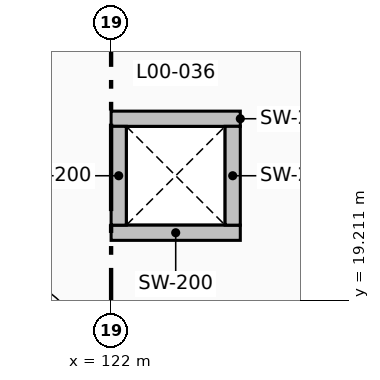
"""IFC4 building model, lengths in metres.
Left out: names, types, materials, properties, quantities, classifications, styles, units other than length and angle.
Written with IfcOpenShell. Run it as: python <this file> out.ifc"""

import sys

from ifc_helpers import new_model, si_unit, direction, frame, frame_2d, origin, place, context, subcontext, project, spatial, rectangle, extrude, element, save


model = new_model("IFC4")
c1 = context("Model", 3, precision=1e-05, world=origin(), true_north=direction((0.0, 1.0)))
c2 = subcontext(c1, "Body", "Model", "MODEL_VIEW")
j1 = project(units=[si_unit("LENGTHUNIT", "METRE"), si_unit("PLANEANGLEUNIT", "RADIAN")], contexts=[c1])
p1 = place(None, origin())
s1 = spatial("IfcSite", under=j1, at=p1, CompositionType="ELEMENT")
p2 = place(p1, origin())
s2 = spatial("IfcBuilding", under=s1, at=p2, CompositionType="ELEMENT")
p3 = place(p2, origin())
s3 = spatial("IfcBuildingStorey", under=s2, at=p3, CompositionType="ELEMENT", Elevation=0.0)
for number, where, z_axis, x_axis in (
    (1, (122.0, 20.1, 0.0), (0.0, 0.0, 1.0), (1.0, 0.0, 0.0)),
    (2, (123.7, 21.6, 0.0), (0.0, 0.0, 1.0), (-1.0, 0.0, 0.0)),
):
    element("IfcWall", number, at=place(p3, frame(where, z_axis=z_axis, x_axis=x_axis)), inside=s3, PredefinedType="PARTITIONING", context=c2, shape_type="SweptSolid", body=[
        extrude(rectangle(XDim=1.7, YDim=0.2, at=frame_2d((0.85, 0.0))), origin(), (0.0, 0.0, 1.0), 5.1),
    ])
p4 = place(p3, frame((122.1, 20.2, 0.0), z_axis=(0.0, 0.0, 1.0), x_axis=(0.0, 1.0, 0.0)))
e3 = element("IfcWall", 3, at=p4, inside=s3, PredefinedType="PARTITIONING", context=c2, shape_type="SweptSolid", body=[
    extrude(rectangle(XDim=1.3, YDim=0.2, at=frame_2d((0.65, 0.0))), origin(), (0.0, 0.0, 1.0), 4.342),
])
p5 = place(p3, frame((123.6, 21.5, 0.0), z_axis=(0.0, 0.0, 1.0), x_axis=(0.0, -1.0, 0.0)))
e4 = element("IfcWall", 4, at=p5, inside=s3, PredefinedType="PARTITIONING", context=c2, shape_type="SweptSolid", body=[
    extrude(rectangle(XDim=1.3, YDim=0.2, at=frame_2d((0.65, 0.0))), origin(), (0.0, 0.0, 1.0), 5.1),
])
save(model, sys.argv[1])
